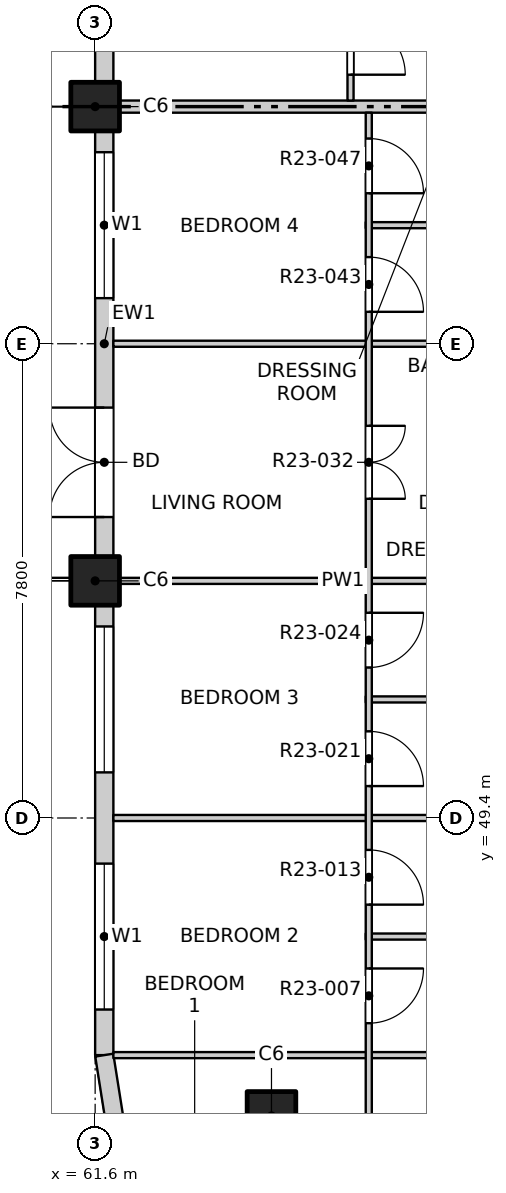
"""IFC4 building model, lengths in metres.
Left out: names, types, materials, properties, quantities, classifications, styles, units other than length and angle.
Written with IfcOpenShell. Run it as: python <this file> out.ifc"""

import sys

from ifc_helpers import new_model, si_unit, direction, frame, frame_2d, origin, origin_2d, place, context, subcontext, project, spatial, rectangle, extrude, element, fill, save


model = new_model("IFC4")
c1 = context("Model", 3, precision=1e-05, world=origin(), true_north=direction((0.0, 1.0)))
c2 = subcontext(c1, "Body", "Model", "MODEL_VIEW")
j1 = project(units=[si_unit("LENGTHUNIT", "METRE"), si_unit("PLANEANGLEUNIT", "RADIAN")], contexts=[c1])
p1 = place(None, origin())
s1 = spatial("IfcSite", under=j1, at=p1, CompositionType="ELEMENT")
p2 = place(p1, origin())
s2 = spatial("IfcBuilding", under=s1, at=p2, CompositionType="ELEMENT")
p3 = place(p2, frame((0.0, 0.0, 238.1)))
s3 = spatial("IfcBuildingStorey", under=s2, at=p3, CompositionType="ELEMENT", Elevation=238.1)
for number, where, z_axis, x_axis in (
    (1, (64.5, 44.5, -0.25), (0.0, 0.0, 1.0), (1.0, 0.0, 0.0)),
    (2, (61.6, 53.3, -0.25), (0.0, 0.0, 1.0), (1.0, 0.0, 0.0)),
    (3, (61.6, 61.1, -0.25), (0.0, 0.0, 1.0), (1.0, 0.0, 0.0)),
):
    element("IfcColumn", number, at=place(p3, frame(where, z_axis=z_axis, x_axis=x_axis)), inside=s3, PredefinedType="COLUMN", context=c2, shape_type="SweptSolid", body=[
        extrude(rectangle(XDim=0.8, YDim=0.8, at=origin_2d()), origin(), (0.0, 0.0, 1.0), 3.35),
    ])
p4 = place(p3, frame((61.75, 45.5, 0.0), z_axis=(0.0, 0.0, 1.0), x_axis=(0.0, 1.0, 0.0)))
e4 = element("IfcWall", 4, at=p4, inside=s3, PredefinedType="SOLIDWALL", context=c2, shape_type="SweptSolid", body=[
    extrude(rectangle(XDim=7.4, YDim=0.3, at=frame_2d((3.7, 0.0))), origin(), (0.0, 0.0, 1.0), 3.1),
])
p5 = place(p4, frame((0.75, 0.0, 0.9)))
e5 = element("IfcOpeningElement", 5, at=p5, cuts=e4, PredefinedType="OPENING", context=c2, shape_type="SweptSolid", body=[
    extrude(rectangle(XDim=2.4, YDim=1.8, at=frame_2d((1.2, 0.9))), frame((0.0, 0.16, 0.0), z_axis=(0.0, -1.0, 0.0), x_axis=(1.0, 0.0, 0.0)), (0.0, 0.0, 1.0), 0.32),
])
p6 = place(p4, frame((4.65, 0.0, 0.9)))
e6 = element("IfcOpeningElement", 6, at=p6, cuts=e4, PredefinedType="OPENING", context=c2, shape_type="SweptSolid", body=[
    extrude(rectangle(XDim=2.4, YDim=1.8, at=frame_2d((1.2, 0.9))), frame((0.0, 0.16, 0.0), z_axis=(0.0, -1.0, 0.0), x_axis=(1.0, 0.0, 0.0)), (0.0, 0.0, 1.0), 0.32),
])
p7 = place(p3, frame((61.75, 53.7, 0.0), z_axis=(0.0, 0.0, 1.0), x_axis=(0.0, 1.0, 0.0)))
e7 = element("IfcWall", 7, at=p7, inside=s3, PredefinedType="SOLIDWALL", context=c2, shape_type="SweptSolid", body=[
    extrude(rectangle(XDim=7.0, YDim=0.3, at=frame_2d((3.5, 0.0))), origin(), (0.0, 0.0, 1.0), 3.1),
])
p8 = place(p7, frame((0.65, 0.0, 0.0)))
e8 = element("IfcOpeningElement", 8, at=p8, cuts=e7, PredefinedType="OPENING", context=c2, shape_type="SweptSolid", body=[
    extrude(rectangle(XDim=1.8, YDim=2.4, at=frame_2d((0.9, 1.2))), frame((0.0, 0.16, 0.0), z_axis=(0.0, -1.0, 0.0), x_axis=(1.0, 0.0, 0.0)), (0.0, 0.0, 1.0), 0.32),
])
p9 = place(p7, frame((4.25, 0.0, 0.9)))
e9 = element("IfcOpeningElement", 9, at=p9, cuts=e7, PredefinedType="OPENING", context=c2, shape_type="SweptSolid", body=[
    extrude(rectangle(XDim=2.4, YDim=1.8, at=frame_2d((1.2, 0.9))), frame((0.0, 0.16, 0.0), z_axis=(0.0, -1.0, 0.0), x_axis=(1.0, 0.0, 0.0)), (0.0, 0.0, 1.0), 0.32),
])
p10 = place(p3, frame((61.75, 61.5, 0.0), z_axis=(0.0, 0.0, 1.0), x_axis=(0.0, 1.0, 0.0)))
e10 = element("IfcWall", 10, at=p10, inside=s3, PredefinedType="SOLIDWALL", context=c2, shape_type="SweptSolid", body=[
    extrude(rectangle(XDim=7.0, YDim=0.3, at=frame_2d((3.5, 0.0))), origin(), (0.0, 0.0, 1.0), 3.1),
])
p11 = place(p10, frame((0.65, 0.0, 0.0)))
e11 = element("IfcOpeningElement", 11, at=p11, cuts=e10, PredefinedType="OPENING", context=c2, shape_type="SweptSolid", body=[
    extrude(rectangle(XDim=1.8, YDim=2.4, at=frame_2d((0.9, 1.2))), frame((0.0, 0.16, 0.0), z_axis=(0.0, -1.0, 0.0), x_axis=(1.0, 0.0, 0.0)), (0.0, 0.0, 1.0), 0.32),
])
p12 = place(p10, frame((4.25, 0.0, 0.9)))
e12 = element("IfcOpeningElement", 12, at=p12, cuts=e10, PredefinedType="OPENING", context=c2, shape_type="SweptSolid", body=[
    extrude(rectangle(XDim=2.4, YDim=1.8, at=frame_2d((1.2, 0.9))), frame((0.0, 0.16, 0.0), z_axis=(0.0, -1.0, 0.0), x_axis=(1.0, 0.0, 0.0)), (0.0, 0.0, 1.0), 0.32),
])
p13 = place(p3, frame((61.75, 45.5, 0.0), z_axis=(0.0, 0.0, 1.0), x_axis=(0.156496880861, -0.987678452879, 0.0)))
e13 = element("IfcWall", 13, at=p13, inside=s3, PredefinedType="SOLIDWALL", context=c2, shape_type="SweptSolid", body=[
    extrude(rectangle(XDim=1.173, YDim=0.3, at=frame_2d((0.586, 0.0))), origin(), (0.0, 0.0, 1.0), 3.1),
])
p14 = place(p3, frame((61.9, 45.5, 0.0), z_axis=(0.0, 0.0, 1.0), x_axis=(1.0, 0.0, 0.0)))
e14 = element("IfcWall", 14, at=p14, inside=s3, PredefinedType="PARTITIONING", context=c2, shape_type="SweptSolid", body=[
    extrude(rectangle(XDim=11.475, YDim=0.1, at=frame_2d((5.737, 0.0))), origin(), (0.0, 0.0, 1.0), 3.1),
])
p15 = place(p14, frame((7.965, 0.0, 0.0)))
e15 = element("IfcOpeningElement", 15, at=p15, cuts=e14, PredefinedType="OPENING", context=c2, shape_type="SweptSolid", body=[
    extrude(rectangle(XDim=0.9, YDim=2.1, at=frame_2d((0.45, 1.05))), frame((0.0, 0.06, 0.0), z_axis=(0.0, -1.0, 0.0), x_axis=(1.0, 0.0, 0.0)), (0.0, 0.0, 1.0), 0.12),
])
p16 = place(p3, frame((66.05, 47.45, 0.0), z_axis=(0.0, 0.0, 1.0), x_axis=(1.0, 0.0, 0.0)))
e16 = element("IfcWall", 16, at=p16, inside=s3, PredefinedType="PARTITIONING", context=c2, shape_type="SweptSolid", body=[
    extrude(rectangle(XDim=3.4, YDim=0.1, at=frame_2d((1.7, 0.0))), origin(), (0.0, 0.0, 1.0), 3.1),
])
p17 = place(p3, frame((61.9, 49.4, 0.0), z_axis=(0.0, 0.0, 1.0), x_axis=(1.0, 0.0, 0.0)))
e17 = element("IfcWall", 17, at=p17, inside=s3, PredefinedType="PARTITIONING", context=c2, shape_type="SweptSolid", body=[
    extrude(rectangle(XDim=7.55, YDim=0.1, at=frame_2d((3.775, 0.0))), origin(), (0.0, 0.0, 1.0), 3.1),
])
p18 = place(p3, frame((66.05, 51.35, 0.0), z_axis=(0.0, 0.0, 1.0), x_axis=(1.0, 0.0, 0.0)))
e18 = element("IfcWall", 18, at=p18, inside=s3, PredefinedType="PARTITIONING", context=c2, shape_type="SweptSolid", body=[
    extrude(rectangle(XDim=3.4, YDim=0.1, at=frame_2d((1.7, 0.0))), origin(), (0.0, 0.0, 1.0), 3.1),
])
for number, where, z_axis, x_axis in (
    (19, (61.9, 53.3, 0.0), (0.0, 0.0, 1.0), (1.0, 0.0, 0.0)),
    (20, (61.9, 57.2, 0.0), (0.0, 0.0, 1.0), (1.0, 0.0, 0.0)),
):
    element("IfcWall", number, at=place(p3, frame(where, z_axis=z_axis, x_axis=x_axis)), inside=s3, PredefinedType="PARTITIONING", context=c2, shape_type="SweptSolid", body=[
        extrude(rectangle(XDim=7.55, YDim=0.1, at=frame_2d((3.775, 0.0))), origin(), (0.0, 0.0, 1.0), 3.1),
    ])
p19 = place(p3, frame((66.05, 59.15, 0.0), z_axis=(0.0, 0.0, 1.0), x_axis=(1.0, 0.0, 0.0)))
e21 = element("IfcWall", 21, at=p19, inside=s3, PredefinedType="PARTITIONING", context=c2, shape_type="SweptSolid", body=[
    extrude(rectangle(XDim=3.4, YDim=0.1, at=frame_2d((1.7, 0.0))), origin(), (0.0, 0.0, 1.0), 3.1),
])
p20 = place(p3, frame((61.9, 61.1, 0.0), z_axis=(0.0, 0.0, 1.0), x_axis=(1.0, 0.0, 0.0)))
e22 = element("IfcWall", 22, at=p20, inside=s3, PredefinedType="PARTITIONING", context=c2, shape_type="SweptSolid", body=[
    extrude(rectangle(XDim=11.5, YDim=0.2, at=frame_2d((5.75, 0.0))), origin(), (0.0, 0.0, 1.0), 3.1),
])
p21 = place(p3, frame((65.8, 61.2, 0.0), z_axis=(0.0, 0.0, 1.0), x_axis=(0.0, 1.0, 0.0)))
e23 = element("IfcWall", 23, at=p21, inside=s3, PredefinedType="PARTITIONING", context=c2, shape_type="SweptSolid", body=[
    extrude(rectangle(XDim=15.4, YDim=0.1, at=frame_2d((7.7, 0.0))), origin(), (0.0, 0.0, 1.0), 3.1),
])
p22 = place(p21, frame((0.425, 0.0, 0.0)))
e24 = element("IfcOpeningElement", 24, at=p22, cuts=e23, PredefinedType="OPENING", context=c2, shape_type="SweptSolid", body=[
    extrude(rectangle(XDim=0.9, YDim=2.1, at=frame_2d((0.45, 1.05))), frame((0.0, 0.06, 0.0), z_axis=(0.0, -1.0, 0.0), x_axis=(1.0, 0.0, 0.0)), (0.0, 0.0, 1.0), 0.12),
])
p23 = place(p21, frame((2.375, 0.0, 0.0)))
e25 = element("IfcOpeningElement", 25, at=p23, cuts=e23, PredefinedType="OPENING", context=c2, shape_type="SweptSolid", body=[
    extrude(rectangle(XDim=0.9, YDim=2.1, at=frame_2d((0.45, 1.05))), frame((0.0, 0.06, 0.0), z_axis=(0.0, -1.0, 0.0), x_axis=(1.0, 0.0, 0.0)), (0.0, 0.0, 1.0), 0.12),
])
p24 = place(p21, frame((4.325, 0.0, 0.0)))
e26 = element("IfcOpeningElement", 26, at=p24, cuts=e23, PredefinedType="OPENING", context=c2, shape_type="SweptSolid", body=[
    extrude(rectangle(XDim=0.9, YDim=2.1, at=frame_2d((0.45, 1.05))), frame((0.0, 0.06, 0.0), z_axis=(0.0, -1.0, 0.0), x_axis=(1.0, 0.0, 0.0)), (0.0, 0.0, 1.0), 0.12),
])
p25 = place(p21, frame((6.275, 0.0, 0.0)))
e27 = element("IfcOpeningElement", 27, at=p25, cuts=e23, PredefinedType="OPENING", context=c2, shape_type="SweptSolid", body=[
    extrude(rectangle(XDim=0.9, YDim=2.1, at=frame_2d((0.45, 1.05))), frame((0.0, 0.06, 0.0), z_axis=(0.0, -1.0, 0.0), x_axis=(1.0, 0.0, 0.0)), (0.0, 0.0, 1.0), 0.12),
])
p26 = place(p21, frame((9.05, 0.0, 0.0)))
e28 = element("IfcOpeningElement", 28, at=p26, cuts=e23, PredefinedType="OPENING", context=c2, shape_type="SweptSolid", body=[
    extrude(rectangle(XDim=1.2, YDim=2.1, at=frame_2d((0.6, 1.05))), frame((0.0, 0.06, 0.0), z_axis=(0.0, -1.0, 0.0), x_axis=(1.0, 0.0, 0.0)), (0.0, 0.0, 1.0), 0.12),
])
p27 = place(p21, frame((12.95, 0.0, 0.0)))
e29 = element("IfcOpeningElement", 29, at=p27, cuts=e23, PredefinedType="OPENING", context=c2, shape_type="SweptSolid", body=[
    extrude(rectangle(XDim=1.2, YDim=2.1, at=frame_2d((0.6, 1.05))), frame((0.0, 0.06, 0.0), z_axis=(0.0, -1.0, 0.0), x_axis=(1.0, 0.0, 0.0)), (0.0, 0.0, 1.0), 0.12),
])
p28 = place(p3, frame((66.1, 41.9, 0.0), z_axis=(0.0, 0.0, 1.0), x_axis=(0.0, 1.0, 0.0)))
e30 = element("IfcWall", 30, at=p28, inside=s3, PredefinedType="PARTITIONING", context=c2, shape_type="SweptSolid", body=[
    extrude(rectangle(XDim=19.1, YDim=0.1, at=frame_2d((9.55, 0.0))), origin(), (0.0, 0.0, 1.0), 3.1),
])
p29 = place(p28, frame((1.05, 0.0, 0.0)))
e31 = element("IfcOpeningElement", 31, at=p29, cuts=e30, PredefinedType="OPENING", context=c2, shape_type="SweptSolid", body=[
    extrude(rectangle(XDim=1.2, YDim=2.1, at=frame_2d((0.6, 1.05))), frame((0.0, 0.06, 0.0), z_axis=(0.0, -1.0, 0.0), x_axis=(1.0, 0.0, 0.0)), (0.0, 0.0, 1.0), 0.12),
])
p30 = place(p28, frame((4.125, 0.0, 0.0)))
e32 = element("IfcOpeningElement", 32, at=p30, cuts=e30, PredefinedType="OPENING", context=c2, shape_type="SweptSolid", body=[
    extrude(rectangle(XDim=0.9, YDim=2.1, at=frame_2d((0.45, 1.05))), frame((0.0, 0.06, 0.0), z_axis=(0.0, -1.0, 0.0), x_axis=(1.0, 0.0, 0.0)), (0.0, 0.0, 1.0), 0.12),
])
p31 = place(p28, frame((6.075, 0.0, 0.0)))
e33 = element("IfcOpeningElement", 33, at=p31, cuts=e30, PredefinedType="OPENING", context=c2, shape_type="SweptSolid", body=[
    extrude(rectangle(XDim=0.9, YDim=2.1, at=frame_2d((0.45, 1.05))), frame((0.0, 0.06, 0.0), z_axis=(0.0, -1.0, 0.0), x_axis=(1.0, 0.0, 0.0)), (0.0, 0.0, 1.0), 0.12),
])
p32 = place(p28, frame((8.025, 0.0, 0.0)))
e34 = element("IfcOpeningElement", 34, at=p32, cuts=e30, PredefinedType="OPENING", context=c2, shape_type="SweptSolid", body=[
    extrude(rectangle(XDim=0.9, YDim=2.1, at=frame_2d((0.45, 1.05))), frame((0.0, 0.06, 0.0), z_axis=(0.0, -1.0, 0.0), x_axis=(1.0, 0.0, 0.0)), (0.0, 0.0, 1.0), 0.12),
])
p33 = place(p28, frame((9.975, 0.0, 0.0)))
e35 = element("IfcOpeningElement", 35, at=p33, cuts=e30, PredefinedType="OPENING", context=c2, shape_type="SweptSolid", body=[
    extrude(rectangle(XDim=0.9, YDim=2.1, at=frame_2d((0.45, 1.05))), frame((0.0, 0.06, 0.0), z_axis=(0.0, -1.0, 0.0), x_axis=(1.0, 0.0, 0.0)), (0.0, 0.0, 1.0), 0.12),
])
p34 = place(p28, frame((12.75, 0.0, 0.0)))
e36 = element("IfcOpeningElement", 36, at=p34, cuts=e30, PredefinedType="OPENING", context=c2, shape_type="SweptSolid", body=[
    extrude(rectangle(XDim=1.2, YDim=2.1, at=frame_2d((0.6, 1.05))), frame((0.0, 0.06, 0.0), z_axis=(0.0, -1.0, 0.0), x_axis=(1.0, 0.0, 0.0)), (0.0, 0.0, 1.0), 0.12),
])
p35 = place(p28, frame((15.825, 0.0, 0.0)))
e37 = element("IfcOpeningElement", 37, at=p35, cuts=e30, PredefinedType="OPENING", context=c2, shape_type="SweptSolid", body=[
    extrude(rectangle(XDim=0.9, YDim=2.1, at=frame_2d((0.45, 1.05))), frame((0.0, 0.06, 0.0), z_axis=(0.0, -1.0, 0.0), x_axis=(1.0, 0.0, 0.0)), (0.0, 0.0, 1.0), 0.12),
])
p36 = place(p28, frame((17.775, 0.0, 0.0)))
e38 = element("IfcOpeningElement", 38, at=p36, cuts=e30, PredefinedType="OPENING", context=c2, shape_type="SweptSolid", body=[
    extrude(rectangle(XDim=0.9, YDim=2.1, at=frame_2d((0.45, 1.05))), frame((0.0, 0.06, 0.0), z_axis=(0.0, -1.0, 0.0), x_axis=(1.0, 0.0, 0.0)), (0.0, 0.0, 1.0), 0.12),
])
p37 = place(p5, origin())
e39 = element("IfcWindow", 39, at=p37, inside=s3, PartitioningType="DOUBLE_PANEL_VERTICAL", PredefinedType="WINDOW", context=c2, shape_type="SweptSolid", body=[
    extrude(rectangle(XDim=2.4, YDim=1.8, at=frame_2d((1.2, 0.9))), frame((0.0, 0.03, 0.0), z_axis=(0.0, -1.0, 0.0), x_axis=(1.0, 0.0, 0.0)), (0.0, 0.0, 1.0), 0.06),
])
fill(e5, e39)
p38 = place(p6, origin())
e40 = element("IfcWindow", 40, at=p38, inside=s3, PartitioningType="DOUBLE_PANEL_VERTICAL", PredefinedType="WINDOW", context=c2, shape_type="SweptSolid", body=[
    extrude(rectangle(XDim=2.4, YDim=1.8, at=frame_2d((1.2, 0.9))), frame((0.0, 0.03, 0.0), z_axis=(0.0, -1.0, 0.0), x_axis=(1.0, 0.0, 0.0)), (0.0, 0.0, 1.0), 0.06),
])
fill(e6, e40)
p39 = place(p8, origin())
e41 = element("IfcDoor", 41, at=p39, inside=s3, OperationType="DOUBLE_DOOR_SINGLE_SWING", PredefinedType="DOOR", context=c2, shape_type="SweptSolid", body=[
    extrude(rectangle(XDim=1.8, YDim=2.4, at=frame_2d((0.9, 1.2))), frame((0.0, 0.025, 0.0), z_axis=(0.0, -1.0, 0.0), x_axis=(1.0, 0.0, 0.0)), (0.0, 0.0, 1.0), 0.05),
])
fill(e8, e41)
p40 = place(p9, origin())
e42 = element("IfcWindow", 42, at=p40, inside=s3, PartitioningType="DOUBLE_PANEL_VERTICAL", PredefinedType="WINDOW", context=c2, shape_type="SweptSolid", body=[
    extrude(rectangle(XDim=2.4, YDim=1.8, at=frame_2d((1.2, 0.9))), frame((0.0, 0.03, 0.0), z_axis=(0.0, -1.0, 0.0), x_axis=(1.0, 0.0, 0.0)), (0.0, 0.0, 1.0), 0.06),
])
fill(e9, e42)
p41 = place(p30, origin())
e43 = element("IfcDoor", 43, at=p41, inside=s3, OperationType="SINGLE_SWING_LEFT", PredefinedType="DOOR", context=c2, shape_type="SweptSolid", body=[
    extrude(rectangle(XDim=0.9, YDim=2.1, at=frame_2d((0.45, 1.05))), frame((0.0, 0.025, 0.0), z_axis=(0.0, -1.0, 0.0), x_axis=(1.0, 0.0, 0.0)), (0.0, 0.0, 1.0), 0.05),
])
fill(e32, e43)
p42 = place(p31, origin())
e44 = element("IfcDoor", 44, at=p42, inside=s3, OperationType="SINGLE_SWING_RIGHT", PredefinedType="DOOR", context=c2, shape_type="SweptSolid", body=[
    extrude(rectangle(XDim=0.9, YDim=2.1, at=frame_2d((0.45, 1.05))), frame((0.0, 0.025, 0.0), z_axis=(0.0, -1.0, 0.0), x_axis=(1.0, 0.0, 0.0)), (0.0, 0.0, 1.0), 0.05),
])
fill(e33, e44)
p43 = place(p32, origin())
e45 = element("IfcDoor", 45, at=p43, inside=s3, OperationType="SINGLE_SWING_RIGHT", PredefinedType="DOOR", context=c2, shape_type="SweptSolid", body=[
    extrude(rectangle(XDim=0.9, YDim=2.1, at=frame_2d((0.45, 1.05))), frame((0.0, 0.025, 0.0), z_axis=(0.0, -1.0, 0.0), x_axis=(1.0, 0.0, 0.0)), (0.0, 0.0, 1.0), 0.05),
])
fill(e34, e45)
p44 = place(p33, origin())
e46 = element("IfcDoor", 46, at=p44, inside=s3, OperationType="SINGLE_SWING_LEFT", PredefinedType="DOOR", context=c2, shape_type="SweptSolid", body=[
    extrude(rectangle(XDim=0.9, YDim=2.1, at=frame_2d((0.45, 1.05))), frame((0.0, 0.025, 0.0), z_axis=(0.0, -1.0, 0.0), x_axis=(1.0, 0.0, 0.0)), (0.0, 0.0, 1.0), 0.05),
])
fill(e35, e46)
p45 = place(p34, origin())
e47 = element("IfcDoor", 47, at=p45, inside=s3, OperationType="DOUBLE_DOOR_SINGLE_SWING", PredefinedType="DOOR", context=c2, shape_type="SweptSolid", body=[
    extrude(rectangle(XDim=1.2, YDim=2.1, at=frame_2d((0.6, 1.05))), frame((0.0, 0.025, 0.0), z_axis=(0.0, -1.0, 0.0), x_axis=(1.0, 0.0, 0.0)), (0.0, 0.0, 1.0), 0.05),
])
fill(e36, e47)
p46 = place(p35, origin())
e48 = element("IfcDoor", 48, at=p46, inside=s3, OperationType="SINGLE_SWING_RIGHT", PredefinedType="DOOR", context=c2, shape_type="SweptSolid", body=[
    extrude(rectangle(XDim=0.9, YDim=2.1, at=frame_2d((0.45, 1.05))), frame((0.0, 0.025, 0.0), z_axis=(0.0, -1.0, 0.0), x_axis=(1.0, 0.0, 0.0)), (0.0, 0.0, 1.0), 0.05),
])
fill(e37, e48)
p47 = place(p36, origin())
e49 = element("IfcDoor", 49, at=p47, inside=s3, OperationType="SINGLE_SWING_RIGHT", PredefinedType="DOOR", context=c2, shape_type="SweptSolid", body=[
    extrude(rectangle(XDim=0.9, YDim=2.1, at=frame_2d((0.45, 1.05))), frame((0.0, 0.025, 0.0), z_axis=(0.0, -1.0, 0.0), x_axis=(1.0, 0.0, 0.0)), (0.0, 0.0, 1.0), 0.05),
])
fill(e38, e49)
p48 = place(p22, origin())
e50 = element("IfcDoor", 50, at=p48, inside=s3, OperationType="SINGLE_SWING_RIGHT", PredefinedType="DOOR", context=c2, shape_type="SweptSolid", body=[
    extrude(rectangle(XDim=0.9, YDim=2.1, at=frame_2d((0.45, 1.05))), frame((0.0, 0.025, 0.0), z_axis=(0.0, -1.0, 0.0), x_axis=(1.0, 0.0, 0.0)), (0.0, 0.0, 1.0), 0.05),
])
fill(e24, e50)
save(model, sys.argv[1])
